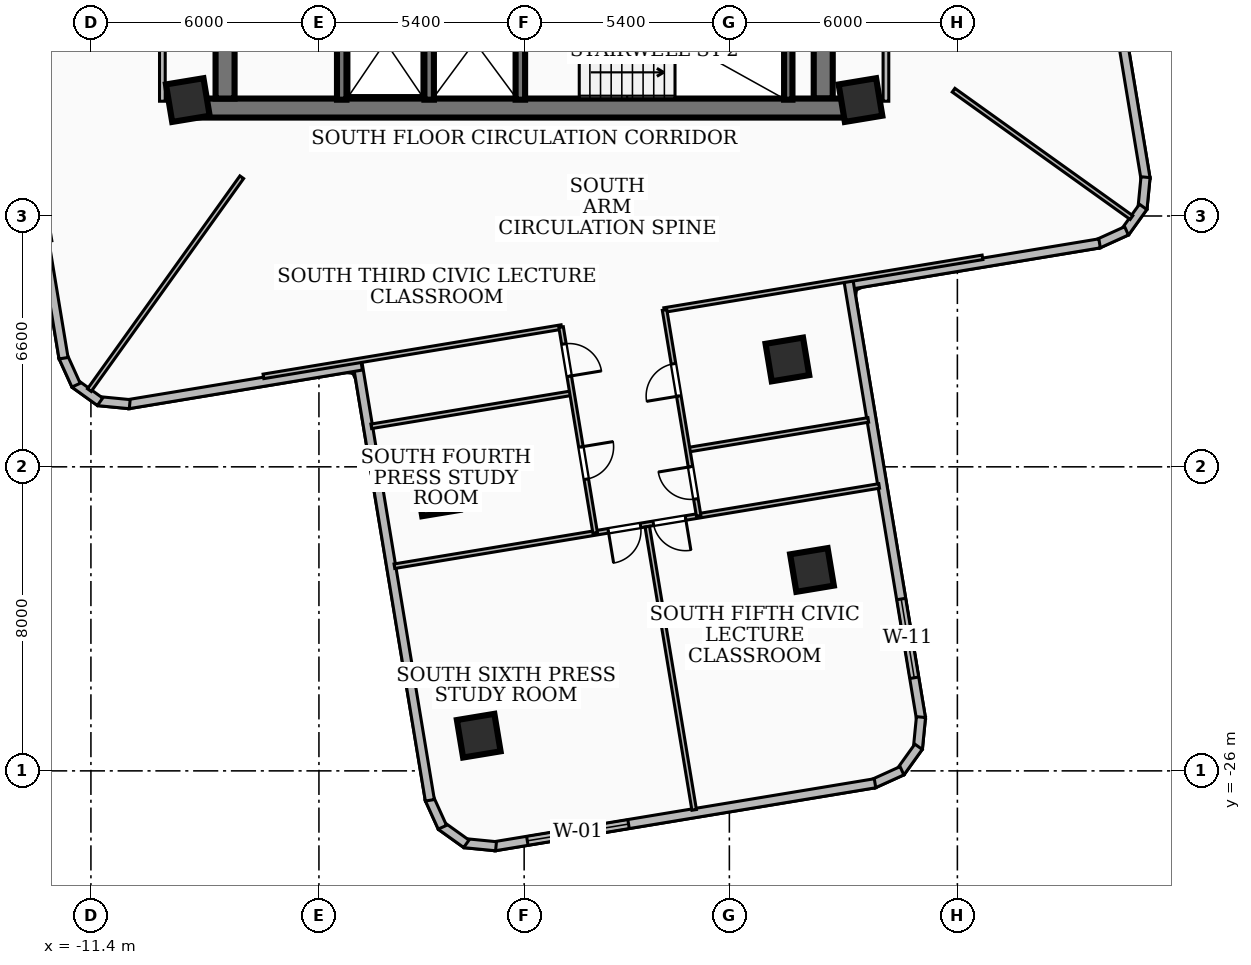
"""IFC4 building model, lengths in metres.
Left out: names, types, materials, properties, quantities, classifications, styles, units other than length and angle.
Written with IfcOpenShell. Run it as: python <this file> out.ifc"""

import sys

from ifc_helpers import new_model, si_unit, direction, frame, frame_2d, origin, origin_2d, place, context, subcontext, project, spatial, rectangle, extrude, element, fill, save


model = new_model("IFC4")
c1 = context("Model", 3, precision=1e-05, world=origin(), true_north=direction((0.0, 1.0)))
c2 = subcontext(c1, "Body", "Model", "MODEL_VIEW")
j1 = project(units=[si_unit("LENGTHUNIT", "METRE"), si_unit("PLANEANGLEUNIT", "RADIAN")], contexts=[c1])
p1 = place(None, origin())
s1 = spatial("IfcSite", under=j1, at=p1, CompositionType="ELEMENT")
p2 = place(p1, origin())
s2 = spatial("IfcBuilding", under=s1, at=p2, CompositionType="ELEMENT")
p3 = place(p2, frame((0.0, 0.0, 96.48)))
s3 = spatial("IfcBuildingStorey", under=s2, at=p3, CompositionType="ELEMENT", Elevation=96.48)
p4 = place(p3, frame((8.78, -8.56, 0.0), z_axis=(0.0, 0.0, 1.0), x_axis=(-1.0, 0.0, 0.0)))
e1 = element("IfcWall", 1, at=p4, inside=s3, PredefinedType="SHEAR", context=c2, shape_type="SweptSolid", body=[
    extrude(rectangle(XDim=17.56, YDim=0.5, at=frame_2d((8.78, 0.0))), origin(), (0.0, 0.0, 1.0), 3.34),
])
for number, where, z_axis, x_axis in (
    (2, (-7.87, -8.31, 0.0), (0.0, 0.0, 1.0), (0.0, 1.0, 0.0)),
    (3, (7.87, -2.0, 0.0), (0.0, 0.0, 1.0), (0.0, -1.0, 0.0)),
):
    element("IfcWall", number, at=place(p3, frame(where, z_axis=z_axis, x_axis=x_axis)), inside=s3, PredefinedType="SHEAR", context=c2, shape_type="SweptSolid", body=[
        extrude(rectangle(XDim=6.31, YDim=0.5, at=frame_2d((3.155, 0.0))), origin(), (0.0, 0.0, 1.0), 3.34),
    ])
p5 = place(p3, frame((6.95, -8.34, 0.0), z_axis=(0.0, 0.0, 1.0), x_axis=(0.0, 1.0, 0.0)))
e4 = element("IfcWall", 4, at=p5, inside=s3, PredefinedType="SOLIDWALL", context=c2, shape_type="SweptSolid", body=[
    extrude(rectangle(XDim=3.06, YDim=0.22, at=frame_2d((1.53, 0.0))), origin(), (0.0, 0.0, 1.0), 3.34),
])
for number, where, z_axis, x_axis in (
    (5, (-0.1, -8.34, 0.0), (0.0, 0.0, 1.0), (0.0, 1.0, 0.0)),
    (6, (-2.5, -8.34, 0.0), (0.0, 0.0, 1.0), (0.0, 1.0, 0.0)),
    (7, (-4.8, -8.34, 0.0), (0.0, 0.0, 1.0), (0.0, 1.0, 0.0)),
):
    element("IfcWall", number, at=place(p3, frame(where, z_axis=z_axis, x_axis=x_axis)), inside=s3, PredefinedType="SOLIDWALL", context=c2, shape_type="SweptSolid", body=[
        extrude(rectangle(XDim=3.04, YDim=0.25, at=frame_2d((1.52, 0.0))), origin(), (0.0, 0.0, 1.0), 3.34),
    ])
for number, where, z_axis, x_axis in (
    (8, (8.85, -8.35, 0.0), (0.0, 0.0, 1.0), (0.987, 0.163, 0.0)),
    (9, (-8.85, -8.35, 0.0), (0.0, 0.0, 1.0), (0.987, 0.163, 0.0)),
    (10, (-2.271, -18.724, 0.0), (0.0, 0.0, 1.0), (0.987, 0.163, 0.0)),
    (11, (6.927, -15.175, 0.0), (0.0, 0.0, 1.0), (0.987, 0.163, 0.0)),
    (12, (-1.195, -25.074, 0.0), (0.0, 0.0, 1.0), (0.987, 0.163, 0.0)),
    (13, (7.574, -20.714, 0.0), (0.0, 0.0, 1.0), (0.987, 0.163, 0.0)),
):
    element("IfcColumn", number, at=place(p3, frame(where, z_axis=z_axis, x_axis=x_axis)), inside=s3, PredefinedType="COLUMN", context=c2, shape_type="SweptSolid", body=[
        extrude(rectangle(XDim=1.0, YDim=1.0, at=origin_2d()), origin(), (0.0, 0.0, 1.0), 3.6),
    ])
p6 = place(p3, frame((15.335, -4.276, 0.0), z_axis=(0.0, 0.0, 1.0), x_axis=(0.16323720082, -0.986586851863, 0.0)))
e14 = element("IfcWall", 14, at=p6, inside=s3, PredefinedType="SOLIDWALL", context=c2, shape_type="SweptSolid", body=[
    extrude(rectangle(XDim=6.237, YDim=0.24, at=frame_2d((3.118, 0.0))), origin(), (0.0, 0.0, 1.0), 3.34),
])
p7 = place(p3, frame((16.351, -10.379, 0.0), z_axis=(0.0, 0.0, 1.0), x_axis=(-0.096474594184, -0.995335447313, 0.0)))
e15 = element("IfcWall", 15, at=p7, inside=s3, PredefinedType="SOLIDWALL", context=c2, shape_type="SweptSolid", body=[
    extrude(rectangle(XDim=0.83, YDim=0.24, at=frame_2d((0.415, 0.0))), origin(), (0.0, 0.0, 1.0), 3.34),
])
p8 = place(p3, frame((16.288, -11.16, 0.0), z_axis=(0.0, 0.0, 1.0), x_axis=(-0.583561896965, -0.812068662375, 0.0)))
e16 = element("IfcWall", 16, at=p8, inside=s3, PredefinedType="SOLIDWALL", context=c2, shape_type="SweptSolid", body=[
    extrude(rectangle(XDim=0.814, YDim=0.24, at=frame_2d((0.407, 0.0))), origin(), (0.0, 0.0, 1.0), 3.34),
])
p9 = place(p3, frame((15.851, -11.791, 0.0), z_axis=(0.0, 0.0, 1.0), x_axis=(-0.910868773958, -0.412696106872, 0.0)))
e17 = element("IfcWall", 17, at=p9, inside=s3, PredefinedType="SOLIDWALL", context=c2, shape_type="SweptSolid", body=[
    extrude(rectangle(XDim=0.831, YDim=0.24, at=frame_2d((0.416, 0.0))), origin(), (0.0, 0.0, 1.0), 3.34),
])
p10 = place(p3, frame((15.142, -12.12, 0.0), z_axis=(0.0, 0.0, 1.0), x_axis=(-0.986586085056, -0.163241835244, 0.0)))
e18 = element("IfcWall", 18, at=p10, inside=s3, PredefinedType="SOLIDWALL", context=c2, shape_type="SweptSolid", body=[
    extrude(rectangle(XDim=6.775, YDim=0.24, at=frame_2d((3.387, 0.0))), origin(), (0.0, 0.0, 1.0), 3.34),
])
p11 = place(p3, frame((8.537, -13.115, 0.0), z_axis=(0.0, 0.0, 1.0), x_axis=(0.16331392199, -0.986574154782, 0.0)))
e19 = element("IfcWall", 19, at=p11, inside=s3, PredefinedType="SOLIDWALL", context=c2, shape_type="SweptSolid", body=[
    extrude(rectangle(XDim=11.677, YDim=0.24, at=frame_2d((5.838, 0.0))), origin(), (0.0, 0.0, 1.0), 3.34),
])
p12 = place(p11, frame((8.477, 0.0, 0.85)))
e20 = element("IfcOpeningElement", 20, at=p12, cuts=e19, PredefinedType="OPENING", context=c2, shape_type="SweptSolid", body=[
    extrude(rectangle(XDim=2.1, YDim=1.6, at=frame_2d((1.05, 0.8))), frame((0.0, 0.13, 0.0), z_axis=(0.0, -1.0, 0.0), x_axis=(1.0, 0.0, 0.0)), (0.0, 0.0, 1.0), 0.26),
])
p13 = place(p3, frame((10.442, -24.585, 0.0), z_axis=(0.0, 0.0, 1.0), x_axis=(-0.097377162125, -0.995247551264, 0.0)))
e21 = element("IfcWall", 21, at=p13, inside=s3, PredefinedType="SOLIDWALL", context=c2, shape_type="SweptSolid", body=[
    extrude(rectangle(XDim=0.83, YDim=0.24, at=frame_2d((0.415, 0.0))), origin(), (0.0, 0.0, 1.0), 3.34),
])
p14 = place(p3, frame((10.378, -25.366, 0.0), z_axis=(0.0, 0.0, 1.0), x_axis=(-0.582571818602, -0.812779229662, 0.0)))
e22 = element("IfcWall", 22, at=p14, inside=s3, PredefinedType="SOLIDWALL", context=c2, shape_type="SweptSolid", body=[
    extrude(rectangle(XDim=0.813, YDim=0.24, at=frame_2d((0.407, 0.0))), origin(), (0.0, 0.0, 1.0), 3.34),
])
p15 = place(p3, frame((9.942, -25.997, 0.0), z_axis=(0.0, 0.0, 1.0), x_axis=(-0.910818725684, -0.412806551479, 0.0)))
e23 = element("IfcWall", 23, at=p15, inside=s3, PredefinedType="SOLIDWALL", context=c2, shape_type="SweptSolid", body=[
    extrude(rectangle(XDim=0.831, YDim=0.24, at=frame_2d((0.416, 0.0))), origin(), (0.0, 0.0, 1.0), 3.34),
])
p16 = place(p3, frame((9.233, -26.326, 0.0), z_axis=(0.0, 0.0, 1.0), x_axis=(-0.986573887112, -0.163315538969, 0.0)))
e24 = element("IfcWall", 24, at=p16, inside=s3, PredefinedType="SOLIDWALL", context=c2, shape_type="SweptSolid", body=[
    extrude(rectangle(XDim=10.159, YDim=0.24, at=frame_2d((5.08, 0.0))), origin(), (0.0, 0.0, 1.0), 3.34),
])
p17 = place(p16, frame((6.574, 0.0, 0.85)))
e25 = element("IfcOpeningElement", 25, at=p17, cuts=e24, PredefinedType="OPENING", context=c2, shape_type="SweptSolid", body=[
    extrude(rectangle(XDim=2.7, YDim=2.1, at=frame_2d((1.35, 1.05))), frame((0.0, 0.13, 0.0), z_axis=(0.0, -1.0, 0.0), x_axis=(1.0, 0.0, 0.0)), (0.0, 0.0, 1.0), 0.26),
])
p18 = place(p3, frame((-0.74, -27.983, 0.0), z_axis=(0.0, 0.0, 1.0), x_axis=(-0.995247551264, 0.097377162125, 0.0)))
e26 = element("IfcWall", 26, at=p18, inside=s3, PredefinedType="SOLIDWALL", context=c2, shape_type="SweptSolid", body=[
    extrude(rectangle(XDim=0.83, YDim=0.24, at=frame_2d((0.415, 0.0))), origin(), (0.0, 0.0, 1.0), 3.34),
])
p19 = place(p3, frame((-1.521, -27.919, 0.0), z_axis=(0.0, 0.0, 1.0), x_axis=(-0.812677327872, 0.582713961359, 0.0)))
e27 = element("IfcWall", 27, at=p19, inside=s3, PredefinedType="SOLIDWALL", context=c2, shape_type="SweptSolid", body=[
    extrude(rectangle(XDim=0.813, YDim=0.24, at=frame_2d((0.407, 0.0))), origin(), (0.0, 0.0, 1.0), 3.34),
])
p20 = place(p3, frame((-2.152, -27.483, 0.0), z_axis=(0.0, 0.0, 1.0), x_axis=(-0.412806551479, 0.910818725684, 0.0)))
e28 = element("IfcWall", 28, at=p20, inside=s3, PredefinedType="SOLIDWALL", context=c2, shape_type="SweptSolid", body=[
    extrude(rectangle(XDim=0.831, YDim=0.24, at=frame_2d((0.416, 0.0))), origin(), (0.0, 0.0, 1.0), 3.34),
])
p21 = place(p3, frame((-2.481, -26.774, 0.0), z_axis=(0.0, 0.0, 1.0), x_axis=(-0.16326282821, 0.986582611303, 0.0)))
e29 = element("IfcWall", 29, at=p21, inside=s3, PredefinedType="SOLIDWALL", context=c2, shape_type="SweptSolid", body=[
    extrude(rectangle(XDim=11.675, YDim=0.24, at=frame_2d((5.837, 0.0))), origin(), (0.0, 0.0, 1.0), 2.486),
])
p22 = place(p3, frame((-4.276, -15.335, 0.0), z_axis=(0.0, 0.0, 1.0), x_axis=(-0.986586851863, -0.16323720082, 0.0)))
e30 = element("IfcWall", 30, at=p22, inside=s3, PredefinedType="SOLIDWALL", context=c2, shape_type="SweptSolid", body=[
    extrude(rectangle(XDim=6.237, YDim=0.24, at=frame_2d((3.118, 0.0))), origin(), (0.0, 0.0, 1.0), 2.486),
])
p23 = place(p3, frame((-10.379, -16.351, 0.0), z_axis=(0.0, 0.0, 1.0), x_axis=(-0.995335447313, 0.096474594184, 0.0)))
e31 = element("IfcWall", 31, at=p23, inside=s3, PredefinedType="SOLIDWALL", context=c2, shape_type="SweptSolid", body=[
    extrude(rectangle(XDim=0.83, YDim=0.24, at=frame_2d((0.415, 0.0))), origin(), (0.0, 0.0, 1.0), 3.34),
])
p24 = place(p3, frame((-11.16, -16.288, 0.0), z_axis=(0.0, 0.0, 1.0), x_axis=(-0.812068662375, 0.583561896965, 0.0)))
e32 = element("IfcWall", 32, at=p24, inside=s3, PredefinedType="SOLIDWALL", context=c2, shape_type="SweptSolid", body=[
    extrude(rectangle(XDim=0.814, YDim=0.24, at=frame_2d((0.407, 0.0))), origin(), (0.0, 0.0, 1.0), 3.34),
])
p25 = place(p3, frame((-11.791, -15.851, 0.0), z_axis=(0.0, 0.0, 1.0), x_axis=(-0.412696106872, 0.910868773958, 0.0)))
e33 = element("IfcWall", 33, at=p25, inside=s3, PredefinedType="SOLIDWALL", context=c2, shape_type="SweptSolid", body=[
    extrude(rectangle(XDim=0.831, YDim=0.24, at=frame_2d((0.416, 0.0))), origin(), (0.0, 0.0, 1.0), 3.34),
])
p26 = place(p3, frame((-12.12, -15.142, 0.0), z_axis=(0.0, 0.0, 1.0), x_axis=(-0.163241835244, 0.986586085056, 0.0)))
e34 = element("IfcWall", 34, at=p26, inside=s3, PredefinedType="SOLIDWALL", context=c2, shape_type="SweptSolid", body=[
    extrude(rectangle(XDim=6.775, YDim=0.24, at=frame_2d((3.387, 0.0))), origin(), (0.0, 0.0, 1.0), 3.34),
])
for number, where, z_axis, x_axis in (
    (35, (-9.52, -8.38, 0.0), (0.0, 0.0, 1.0), (0.0, 1.0, 0.0)),
    (36, (9.52, -8.38, 0.0), (0.0, 0.0, 1.0), (0.0, 1.0, 0.0)),
):
    element("IfcWall", number, at=place(p3, frame(where, z_axis=z_axis, x_axis=x_axis)), inside=s3, PredefinedType="PARTITIONING", context=c2, shape_type="SweptSolid", body=[
        extrude(rectangle(XDim=6.63, YDim=0.15, at=frame_2d((3.315, 0.0))), origin(), (0.0, 0.0, 1.0), 2.486),
    ])
p27 = place(p3, frame((-7.431, -10.38, 0.0), z_axis=(0.0, 0.0, 1.0), x_axis=(-0.582126278944, -0.813098392178, 0.0)))
e37 = element("IfcWall", 37, at=p27, inside=s3, PredefinedType="PARTITIONING", context=c2, shape_type="SweptSolid", body=[
    extrude(rectangle(XDim=6.889, YDim=0.12, at=frame_2d((3.444, 0.0))), origin(), (0.0, 0.0, 1.0), 2.486),
])
p28 = place(p3, frame((11.3, -8.09, 0.0), z_axis=(0.0, 0.0, 1.0), x_axis=(0.813131268368, -0.582080355623, 0.0)))
e38 = element("IfcWall", 38, at=p28, inside=s3, PredefinedType="PARTITIONING", context=c2, shape_type="SweptSolid", body=[
    extrude(rectangle(XDim=5.757, YDim=0.12, at=frame_2d((2.878, 0.0))), origin(), (0.0, 0.0, 1.0), 3.34),
])
p29 = place(p3, frame((3.686, -13.874, 0.0), z_axis=(0.0, 0.0, 1.0), x_axis=(0.98658138377, 0.163270245909, 0.0)))
e39 = element("IfcWall", 39, at=p29, inside=s3, PredefinedType="PARTITIONING", context=c2, shape_type="SweptSolid", body=[
    extrude(rectangle(XDim=8.489, YDim=0.12, at=frame_2d((4.245, 0.0))), origin(), (0.0, 0.0, 1.0), 2.486),
])
p30 = place(p3, frame((-6.86, -15.62, 0.0), z_axis=(0.0, 0.0, 1.0), x_axis=(0.986575116384, 0.16330811288, 0.0)))
e40 = element("IfcWall", 40, at=p30, inside=s3, PredefinedType="PARTITIONING", context=c2, shape_type="SweptSolid", body=[
    extrude(rectangle(XDim=7.949, YDim=0.12, at=frame_2d((3.974, 0.0))), origin(), (0.0, 0.0, 1.0), 2.486),
])
p31 = place(p3, frame((4.324, -17.549, 0.0), z_axis=(0.0, 0.0, 1.0), x_axis=(0.986580422227, 0.163276056047, 0.0)))
e41 = element("IfcWall", 41, at=p31, inside=s3, PredefinedType="PARTITIONING", context=c2, shape_type="SweptSolid", body=[
    extrude(rectangle(XDim=4.795, YDim=0.12, at=frame_2d((2.398, 0.0))), origin(), (0.0, 0.0, 1.0), 2.486),
])
p32 = place(p3, frame((-4.023, -16.934, 0.0), z_axis=(0.0, 0.0, 1.0), x_axis=(0.986577604904, 0.16329307855, 0.0)))
e42 = element("IfcWall", 42, at=p32, inside=s3, PredefinedType="PARTITIONING", context=c2, shape_type="SweptSolid", body=[
    extrude(rectangle(XDim=5.334, YDim=0.12, at=frame_2d((2.667, 0.0))), origin(), (0.0, 0.0, 1.0), 2.486),
])
p33 = place(p3, frame((4.592, -19.289, 0.0), z_axis=(0.0, 0.0, 1.0), x_axis=(-0.163389271883, 0.986561678677, 0.0)))
e43 = element("IfcWall", 43, at=p33, inside=s3, PredefinedType="PARTITIONING", context=c2, shape_type="SweptSolid", body=[
    extrude(rectangle(XDim=5.49, YDim=0.12, at=frame_2d((2.745, 0.0))), origin(), (0.0, 0.0, 1.0), 3.34),
])
p34 = place(p33, frame((3.195, 0.0, 0.0)))
e44 = element("IfcOpeningElement", 44, at=p34, cuts=e43, PredefinedType="OPENING", context=c2, shape_type="SweptSolid", body=[
    extrude(rectangle(XDim=0.86, YDim=2.04, at=frame_2d((0.43, 1.02))), frame((0.0, 0.07, 0.0), z_axis=(0.0, -1.0, 0.0), x_axis=(1.0, 0.0, 0.0)), (0.0, 0.0, 1.0), 0.14),
])
p35 = place(p33, frame((0.45, 0.0, 0.0)))
e45 = element("IfcOpeningElement", 45, at=p35, cuts=e43, PredefinedType="OPENING", context=c2, shape_type="SweptSolid", body=[
    extrude(rectangle(XDim=0.86, YDim=2.04, at=frame_2d((0.43, 1.02))), frame((0.0, 0.07, 0.0), z_axis=(0.0, -1.0, 0.0), x_axis=(1.0, 0.0, 0.0)), (0.0, 0.0, 1.0), 0.14),
])
p36 = place(p3, frame((0.972, -14.324, 0.0), z_axis=(0.0, 0.0, 1.0), x_axis=(0.163389271883, -0.986561678677, 0.0)))
e46 = element("IfcWall", 46, at=p36, inside=s3, PredefinedType="PARTITIONING", context=c2, shape_type="SweptSolid", body=[
    extrude(rectangle(XDim=5.49, YDim=0.12, at=frame_2d((2.745, 0.0))), origin(), (0.0, 0.0, 1.0), 3.34),
])
p37 = place(p36, frame((0.45, 0.0, 0.0)))
e47 = element("IfcOpeningElement", 47, at=p37, cuts=e46, PredefinedType="OPENING", context=c2, shape_type="SweptSolid", body=[
    extrude(rectangle(XDim=0.86, YDim=2.04, at=frame_2d((0.43, 1.02))), frame((0.0, 0.07, 0.0), z_axis=(0.0, -1.0, 0.0), x_axis=(1.0, 0.0, 0.0)), (0.0, 0.0, 1.0), 0.14),
])
p38 = place(p36, frame((3.195, 0.0, 0.0)))
e48 = element("IfcOpeningElement", 48, at=p38, cuts=e46, PredefinedType="OPENING", context=c2, shape_type="SweptSolid", body=[
    extrude(rectangle(XDim=0.86, YDim=2.04, at=frame_2d((0.43, 1.02))), frame((0.0, 0.07, 0.0), z_axis=(0.0, -1.0, 0.0), x_axis=(1.0, 0.0, 0.0)), (0.0, 0.0, 1.0), 0.14),
])
p39 = place(p3, frame((3.24, -19.574, 0.0), z_axis=(0.0, 0.0, 1.0), x_axis=(0.16336126604, -0.986566316452, 0.0)))
e49 = element("IfcWall", 49, at=p39, inside=s3, PredefinedType="PARTITIONING", context=c2, shape_type="SweptSolid", body=[
    extrude(rectangle(XDim=7.555, YDim=0.12, at=frame_2d((3.777, 0.0))), origin(), (0.0, 0.0, 1.0), 2.832),
])
p40 = place(p3, frame((9.342, -18.503, 0.0), z_axis=(0.0, 0.0, 1.0), x_axis=(-0.98656840645, -0.163348643691, 0.0)))
e50 = element("IfcWall", 50, at=p40, inside=s3, PredefinedType="PARTITIONING", context=c2, shape_type="SweptSolid", body=[
    extrude(rectangle(XDim=12.93, YDim=0.12, at=frame_2d((6.465, 0.0))), origin(), (0.0, 0.0, 1.0), 2.486),
])
p41 = place(p40, frame((6.365, 0.0, 0.0)))
e51 = element("IfcOpeningElement", 51, at=p41, cuts=e50, PredefinedType="OPENING", context=c2, shape_type="SweptSolid", body=[
    extrude(rectangle(XDim=0.86, YDim=2.04, at=frame_2d((0.43, 1.02))), frame((0.0, 0.07, 0.0), z_axis=(0.0, -1.0, 0.0), x_axis=(1.0, 0.0, 0.0)), (0.0, 0.0, 1.0), 0.14),
])
p42 = place(p40, frame((5.164, 0.0, 0.0)))
e52 = element("IfcOpeningElement", 52, at=p42, cuts=e50, PredefinedType="OPENING", context=c2, shape_type="SweptSolid", body=[
    extrude(rectangle(XDim=0.86, YDim=2.04, at=frame_2d((0.43, 1.02))), frame((0.0, 0.07, 0.0), z_axis=(0.0, -1.0, 0.0), x_axis=(1.0, 0.0, 0.0)), (0.0, 0.0, 1.0), 0.14),
])
p43 = place(p12, origin())
e53 = element("IfcWindow", 53, at=p43, inside=s3, PartitioningType="SINGLE_PANEL", PredefinedType="WINDOW", context=c2, shape_type="SweptSolid", body=[
    extrude(rectangle(XDim=2.1, YDim=1.6, at=frame_2d((1.05, 0.8))), frame((0.0, 0.03, 0.0), z_axis=(0.0, -1.0, 0.0), x_axis=(1.0, 0.0, 0.0)), (0.0, 0.0, 1.0), 0.06),
])
fill(e20, e53)
p44 = place(p17, origin())
e54 = element("IfcWindow", 54, at=p44, inside=s3, PartitioningType="SINGLE_PANEL", PredefinedType="WINDOW", context=c2, shape_type="SweptSolid", body=[
    extrude(rectangle(XDim=2.7, YDim=2.1, at=frame_2d((1.35, 1.05))), frame((0.0, 0.03, 0.0), z_axis=(0.0, -1.0, 0.0), x_axis=(1.0, 0.0, 0.0)), (0.0, 0.0, 1.0), 0.06),
])
fill(e25, e54)
p45 = place(p34, origin())
e55 = element("IfcDoor", 55, at=p45, inside=s3, OperationType="SINGLE_SWING_LEFT", PredefinedType="DOOR", context=c2, shape_type="SweptSolid", body=[
    extrude(rectangle(XDim=0.86, YDim=2.04, at=frame_2d((0.43, 1.02))), frame((0.0, 0.025, 0.0), z_axis=(0.0, -1.0, 0.0), x_axis=(1.0, 0.0, 0.0)), (0.0, 0.0, 1.0), 0.05),
])
fill(e44, e55)
p46 = place(p35, origin())
e56 = element("IfcDoor", 56, at=p46, inside=s3, OperationType="SINGLE_SWING_RIGHT", PredefinedType="DOOR", context=c2, shape_type="SweptSolid", body=[
    extrude(rectangle(XDim=0.86, YDim=2.04, at=frame_2d((0.43, 1.02))), frame((0.0, 0.025, 0.0), z_axis=(0.0, -1.0, 0.0), x_axis=(1.0, 0.0, 0.0)), (0.0, 0.0, 1.0), 0.05),
])
fill(e45, e56)
p47 = place(p37, origin())
e57 = element("IfcDoor", 57, at=p47, inside=s3, OperationType="SINGLE_SWING_RIGHT", PredefinedType="DOOR", context=c2, shape_type="SweptSolid", body=[
    extrude(rectangle(XDim=0.86, YDim=2.04, at=frame_2d((0.43, 1.02))), frame((0.0, 0.025, 0.0), z_axis=(0.0, -1.0, 0.0), x_axis=(1.0, 0.0, 0.0)), (0.0, 0.0, 1.0), 0.05),
])
fill(e47, e57)
p48 = place(p38, origin())
e58 = element("IfcDoor", 58, at=p48, inside=s3, OperationType="SINGLE_SWING_LEFT", PredefinedType="DOOR", context=c2, shape_type="SweptSolid", body=[
    extrude(rectangle(XDim=0.86, YDim=2.04, at=frame_2d((0.43, 1.02))), frame((0.0, 0.025, 0.0), z_axis=(0.0, -1.0, 0.0), x_axis=(1.0, 0.0, 0.0)), (0.0, 0.0, 1.0), 0.05),
])
fill(e48, e58)
p49 = place(p41, origin())
e59 = element("IfcDoor", 59, at=p49, inside=s3, OperationType="SINGLE_SWING_RIGHT", PredefinedType="DOOR", context=c2, shape_type="SweptSolid", body=[
    extrude(rectangle(XDim=0.86, YDim=2.04, at=frame_2d((0.43, 1.02))), frame((0.0, 0.025, 0.0), z_axis=(0.0, -1.0, 0.0), x_axis=(1.0, 0.0, 0.0)), (0.0, 0.0, 1.0), 0.05),
])
fill(e51, e59)
p50 = place(p42, origin())
e60 = element("IfcDoor", 60, at=p50, inside=s3, OperationType="SINGLE_SWING_LEFT", PredefinedType="DOOR", context=c2, shape_type="SweptSolid", body=[
    extrude(rectangle(XDim=0.86, YDim=2.04, at=frame_2d((0.43, 1.02))), frame((0.0, 0.025, 0.0), z_axis=(0.0, -1.0, 0.0), x_axis=(1.0, 0.0, 0.0)), (0.0, 0.0, 1.0), 0.05),
])
fill(e52, e60)
save(model, sys.argv[1])
